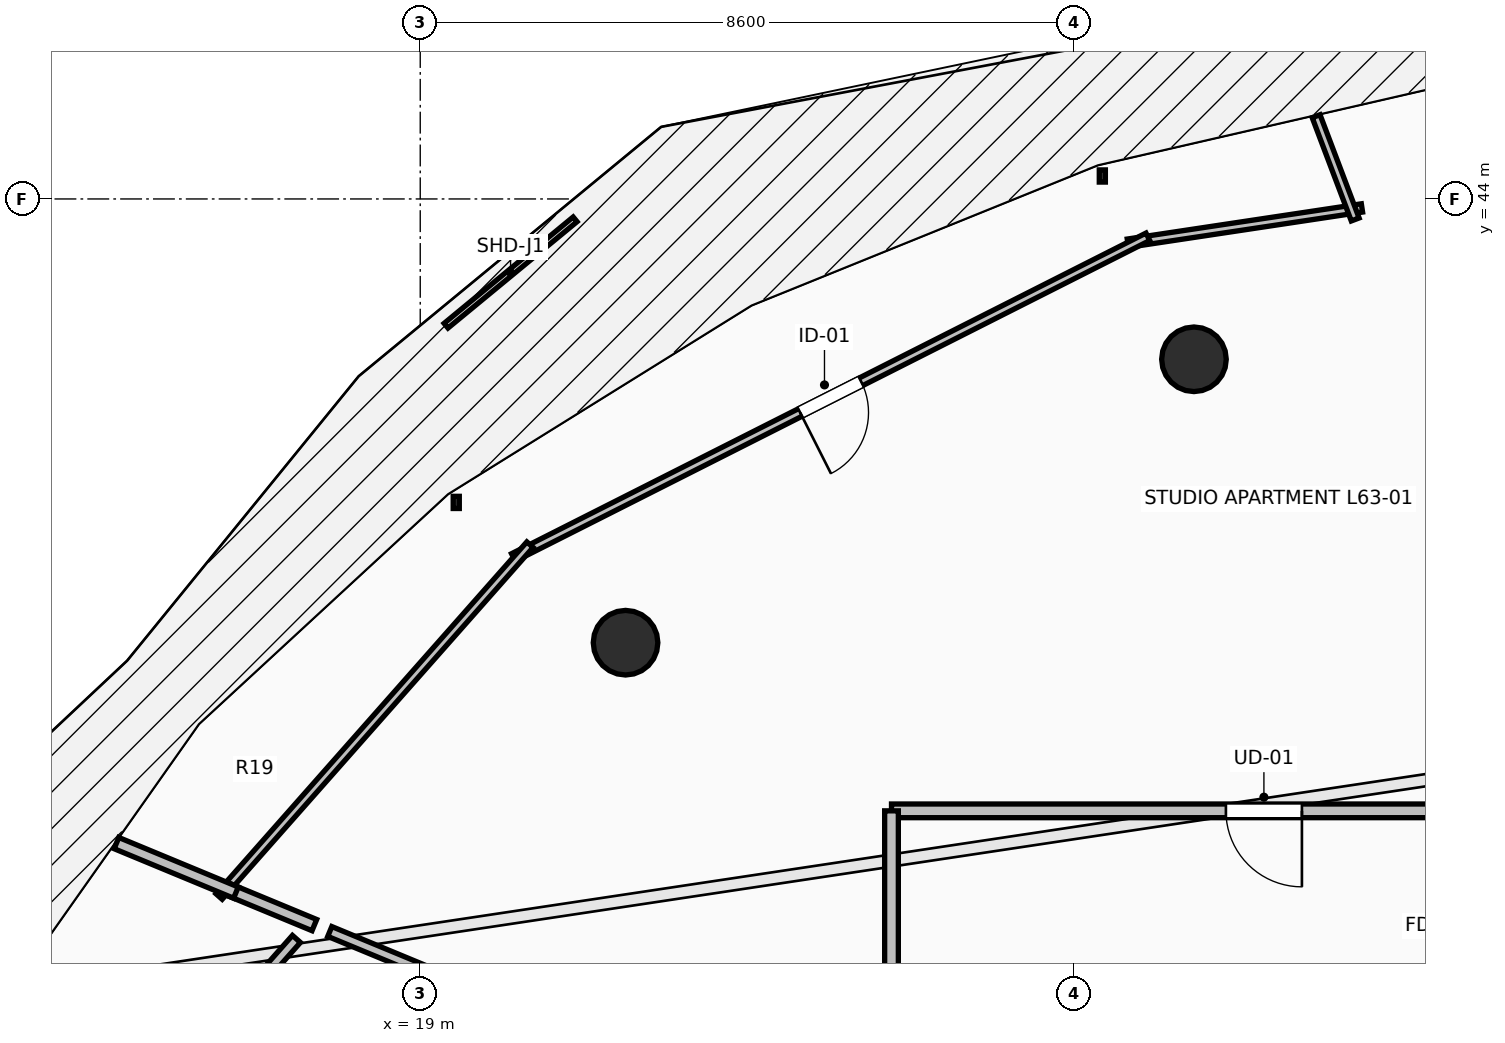
"""IFC4 building model, lengths in metres.
Left out: names, types, materials, properties, quantities, classifications, styles, units other than length and angle.
Written with IfcOpenShell. Run it as: python <this file> out.ifc"""

import sys

from ifc_helpers import new_model, si_unit, direction, frame, frame_2d, origin, origin_2d, place, context, subcontext, project, spatial, rectangle, circle, extrude, element, fill, save


model = new_model("IFC4")
c1 = context("Model", 3, precision=1e-05, world=origin(), true_north=direction((0.0, 1.0)))
c2 = subcontext(c1, "Body", "Model", "MODEL_VIEW")
j1 = project(units=[si_unit("LENGTHUNIT", "METRE"), si_unit("PLANEANGLEUNIT", "RADIAN")], contexts=[c1])
p1 = place(None, origin())
s1 = spatial("IfcSite", under=j1, at=p1, CompositionType="ELEMENT")
p2 = place(p1, origin())
s2 = spatial("IfcBuilding", under=s1, at=p2, CompositionType="ELEMENT")
p3 = place(p2, frame((0.0, 0.0, 234.25)))
s3 = spatial("IfcBuildingStorey", under=s2, at=p3, CompositionType="ELEMENT", Elevation=234.25)
for number, where, z_axis, x_axis in (
    (1, (29.179, 41.891, 0.0), (0.0, 0.0, 1.0), (-0.383, 0.924, 0.0)),
    (2, (21.701, 38.162, 0.0), (0.0, 0.0, 1.0), (-0.707, 0.707, 0.0)),
):
    element("IfcColumn", number, at=place(p3, frame(where, z_axis=z_axis, x_axis=x_axis)), inside=s3, PredefinedType="COLUMN", context=c2, shape_type="SweptSolid", body=[
        extrude(circle(Radius=0.425, at=origin_2d()), origin(), (0.0, 0.0, 1.0), 3.55),
    ])
p4 = place(p3, frame((34.999, 35.95, 0.0), z_axis=(0.0, 0.0, 1.0), x_axis=(-1.0, 0.0, 0.0)))
e3 = element("IfcWall", 3, at=p4, inside=s3, PredefinedType="PARTITIONING", context=c2, shape_type="SweptSolid", body=[
    extrude(rectangle(XDim=9.799, YDim=0.18, at=frame_2d((4.899, 0.0))), origin(), (0.0, 0.0, 1.0), 2.482),
])
p5 = place(p4, frame((4.399, 0.0, 0.0)))
e4 = element("IfcOpeningElement", 4, at=p5, cuts=e3, PredefinedType="OPENING", context=c2, shape_type="SweptSolid", body=[
    extrude(rectangle(XDim=1.0, YDim=2.15, at=frame_2d((0.5, 1.075))), frame((0.0, 0.105, 0.0), z_axis=(0.0, -1.0, 0.0), x_axis=(1.0, 0.0, 0.0)), (0.0, 0.0, 1.0), 0.21),
])
p6 = place(p3, frame((25.2, 35.95, 0.0), z_axis=(0.0, 0.0, 1.0), x_axis=(0.0, -1.0, 0.0)))
e5 = element("IfcWall", 5, at=p6, inside=s3, PredefinedType="PARTITIONING", context=c2, shape_type="SweptSolid", body=[
    extrude(rectangle(XDim=4.708, YDim=0.18, at=frame_2d((2.354, 0.0))), origin(), (0.0, 0.0, 1.0), 2.482),
])
p7 = place(p3, frame((31.389, 43.882, 0.0), z_axis=(0.0, 0.0, 1.0), x_axis=(-0.988858596585, -0.148857905265, 0.0)))
e6 = element("IfcWall", 6, at=p7, inside=s3, PredefinedType="PARTITIONING", context=c2, shape_type="SweptSolid", body=[
    extrude(rectangle(XDim=3.115, YDim=0.11, at=frame_2d((1.557, 0.0))), origin(), (0.0, 0.0, 1.0), 3.29),
])
p8 = place(p3, frame((28.573, 43.502, 0.0), z_axis=(0.0, 0.0, 1.0), x_axis=(-0.892502876412, -0.451041700507, 0.0)))
e7 = element("IfcWall", 7, at=p8, inside=s3, PredefinedType="PARTITIONING", context=c2, shape_type="SweptSolid", body=[
    extrude(rectangle(XDim=9.352, YDim=0.11, at=frame_2d((4.676, 0.0))), origin(), (0.0, 0.0, 1.0), 3.29),
])
p9 = place(p8, frame((4.226, 0.0, 0.0)))
e8 = element("IfcOpeningElement", 8, at=p9, cuts=e7, PredefinedType="OPENING", context=c2, shape_type="SweptSolid", body=[
    extrude(rectangle(XDim=0.9, YDim=2.1, at=frame_2d((0.45, 1.05))), frame((0.0, 0.07, 0.0), z_axis=(0.0, -1.0, 0.0), x_axis=(1.0, 0.0, 0.0)), (0.0, 0.0, 1.0), 0.14),
])
p10 = place(p3, frame((20.444, 39.452, 0.0), z_axis=(0.0, 0.0, 1.0), x_axis=(-0.662167862663, -0.749355537549, 0.0)))
e9 = element("IfcWall", 9, at=p10, inside=s3, PredefinedType="PARTITIONING", context=c2, shape_type="SweptSolid", body=[
    extrude(rectangle(XDim=6.177, YDim=0.11, at=frame_2d((3.089, 0.0))), origin(), (0.0, 0.0, 1.0), 3.29),
])
p11 = place(p3, frame((30.787, 45.089, 0.0), z_axis=(0.0, 0.0, 1.0), x_axis=(0.353737146492, -0.935344872863, 0.0)))
e10 = element("IfcWall", 10, at=p11, inside=s3, PredefinedType="PARTITIONING", context=c2, shape_type="SweptSolid", body=[
    extrude(rectangle(XDim=1.453, YDim=0.11, at=frame_2d((0.727, 0.0))), origin(), (0.0, 0.0, 1.0), 3.29),
])
p12 = place(p3, frame((16.446, 34.928, 0.0), z_axis=(0.0, 0.0, 1.0), x_axis=(0.923851056351, -0.382752172663, 0.0)))
e11 = element("IfcWall", 11, at=p12, inside=s3, PredefinedType="PARTITIONING", context=c2, shape_type="SweptSolid", body=[
    extrude(rectangle(XDim=1.257, YDim=0.16, at=frame_2d((0.628, 0.0))), origin(), (0.0, 0.0, 1.0), 3.29),
])
p13 = place(p3, frame((15.004, 35.526, 0.0), z_axis=(0.0, 0.0, 1.0), x_axis=(0.923843638485, -0.382770076719, 0.0)))
e12 = element("IfcWall", 12, at=p13, inside=s3, PredefinedType="PARTITIONING", context=c2, shape_type="SweptSolid", body=[
    extrude(rectangle(XDim=1.701, YDim=0.16, at=frame_2d((0.851, 0.0))), origin(), (0.0, 0.0, 1.0), 3.29),
])
p14 = place(p3, frame((17.81, 34.363, 0.0), z_axis=(0.0, 0.0, 1.0), x_axis=(0.923888322618, -0.382662210481, 0.0)))
e13 = element("IfcWall", 13, at=p14, inside=s3, PredefinedType="PARTITIONING", context=c2, shape_type="SweptSolid", body=[
    extrude(rectangle(XDim=1.829, YDim=0.14, at=frame_2d((0.915, 0.0))), origin(), (0.0, 0.0, 1.0), 2.874),
])
p15 = place(p3, frame((16.123, 32.853, 0.0), z_axis=(0.0, 0.0, 1.0), x_axis=(0.662302679983, 0.749236384652, 0.0)))
e14 = element("IfcWall", 14, at=p15, inside=s3, PredefinedType="PARTITIONING", context=c2, shape_type="SweptSolid", body=[
    extrude(rectangle(XDim=1.885, YDim=0.14, at=frame_2d((0.942, 0.0))), origin(), (0.0, 0.0, 1.0), 3.29),
])
p16 = place(p5, origin())
e15 = element("IfcDoor", 15, at=p16, inside=s3, OperationType="SINGLE_SWING_LEFT", PredefinedType="DOOR", context=c2, shape_type="SweptSolid", body=[
    extrude(rectangle(XDim=1.0, YDim=2.15, at=frame_2d((0.5, 1.075))), frame((0.0, 0.025, 0.0), z_axis=(0.0, -1.0, 0.0), x_axis=(1.0, 0.0, 0.0)), (0.0, 0.0, 1.0), 0.05),
])
fill(e4, e15)
p17 = place(p9, origin())
e16 = element("IfcDoor", 16, at=p17, inside=s3, OperationType="SINGLE_SWING_RIGHT", PredefinedType="DOOR", context=c2, shape_type="SweptSolid", body=[
    extrude(rectangle(XDim=0.9, YDim=2.1, at=frame_2d((0.45, 1.05))), frame((0.0, 0.025, 0.0), z_axis=(0.0, -1.0, 0.0), x_axis=(1.0, 0.0, 0.0)), (0.0, 0.0, 1.0), 0.05),
])
fill(e8, e16)
save(model, sys.argv[1])
